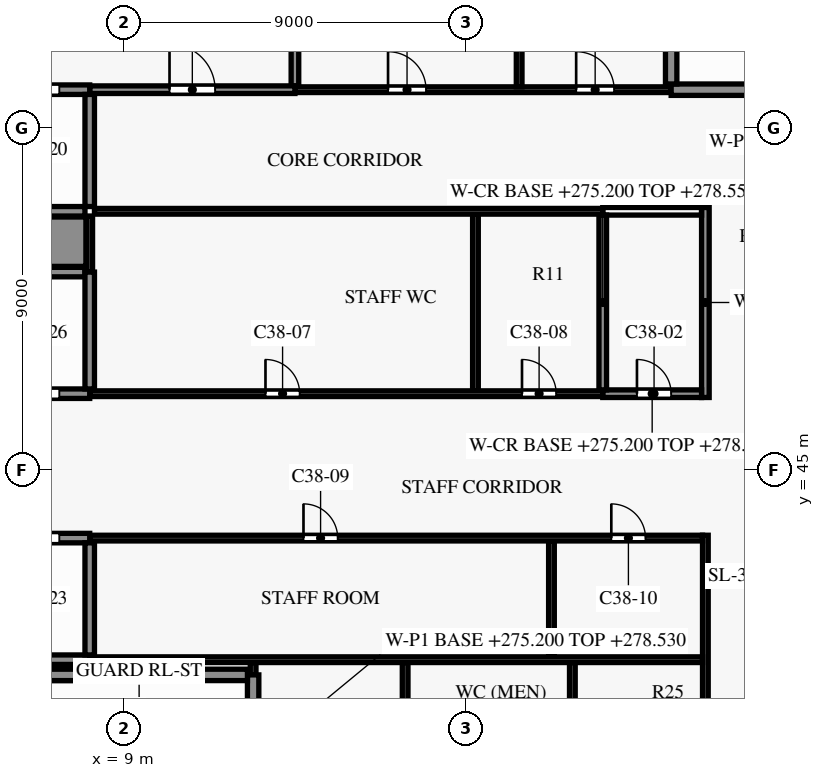
"""IFC4 building model, lengths in metres.
Left out: names, types, materials, properties, quantities, classifications, styles, units other than length and angle.
Written with IfcOpenShell. Run it as: python <this file> out.ifc"""

import sys

from ifc_helpers import new_model, si_unit, direction, frame, frame_2d, origin, place, context, subcontext, project, spatial, rectangle, extrude, element, fill, save


model = new_model("IFC4")
c1 = context("Model", 3, precision=1e-05, world=origin(), true_north=direction((0.0, 1.0)))
c2 = subcontext(c1, "Body", "Model", "MODEL_VIEW")
j1 = project(units=[si_unit("LENGTHUNIT", "METRE"), si_unit("PLANEANGLEUNIT", "RADIAN")], contexts=[c1])
p1 = place(None, origin())
s1 = spatial("IfcSite", under=j1, at=p1, CompositionType="ELEMENT")
p2 = place(p1, origin())
s2 = spatial("IfcBuilding", under=s1, at=p2, CompositionType="ELEMENT")
p3 = place(p2, frame((0.0, 0.0, 275.2)))
s3 = spatial("IfcBuildingStorey", under=s2, at=p3, CompositionType="ELEMENT", Elevation=275.2)
p4 = place(p3, frame((4.55, 39.6, 0.0), z_axis=(0.0, 0.0, 1.0), x_axis=(1.0, 0.0, 0.0)))
e1 = element("IfcWall", 1, at=p4, inside=s3, PredefinedType="SHEAR", context=c2, shape_type="SweptSolid", body=[
    extrude(rectangle(XDim=7.7, YDim=0.3, at=frame_2d((3.85, 0.0))), origin(), (0.0, 0.0, 1.0), 3.5),
])
p5 = place(p3, frame((8.1, 40.0, 0.0), z_axis=(0.0, 0.0, 1.0), x_axis=(1.0, 0.0, 0.0)))
e2 = element("IfcWall", 2, at=p5, inside=s3, PredefinedType="PARTITIONING", context=c2, shape_type="SweptSolid", body=[
    extrude(rectangle(XDim=16.125, YDim=0.15, at=frame_2d((8.062, 0.0))), origin(), (0.0, 0.0, 1.0), 3.35),
])
p6 = place(p3, frame((0.15, 40.0, 0.0), z_axis=(0.0, 0.0, 1.0), x_axis=(1.0, 0.0, 0.0)))
e3 = element("IfcWall", 3, at=p6, inside=s3, PredefinedType="SHEAR", context=c2, shape_type="SweptSolid", body=[
    extrude(rectangle(XDim=7.95, YDim=0.25, at=frame_2d((3.975, 0.0))), origin(), (0.0, 0.0, 1.0), 3.5),
])
p7 = place(p3, frame((8.1, 43.2, 0.0), z_axis=(0.0, 0.0, 1.0), x_axis=(1.0, 0.0, 0.0)))
e4 = element("IfcWall", 4, at=p7, inside=s3, PredefinedType="PARTITIONING", context=c2, shape_type="SweptSolid", body=[
    extrude(rectangle(XDim=16.125, YDim=0.15, at=frame_2d((8.062, 0.0))), origin(), (0.0, 0.0, 1.0), 3.35),
])
p8 = place(p7, frame((5.625, 0.0, 0.0)))
e5 = element("IfcOpeningElement", 5, at=p8, cuts=e4, PredefinedType="OPENING", context=c2, shape_type="SweptSolid", body=[
    extrude(rectangle(XDim=0.9, YDim=2.1, at=frame_2d((0.45, 1.05))), frame((0.0, 0.085, 0.0), z_axis=(0.0, -1.0, 0.0), x_axis=(1.0, 0.0, 0.0)), (0.0, 0.0, 1.0), 0.17),
])
p9 = place(p7, frame((13.725, 0.0, 0.0)))
e6 = element("IfcOpeningElement", 6, at=p9, cuts=e4, PredefinedType="OPENING", context=c2, shape_type="SweptSolid", body=[
    extrude(rectangle(XDim=0.9, YDim=2.1, at=frame_2d((0.45, 1.05))), frame((0.0, 0.085, 0.0), z_axis=(0.0, -1.0, 0.0), x_axis=(1.0, 0.0, 0.0)), (0.0, 0.0, 1.0), 0.17),
])
p10 = place(p3, frame((0.125, 43.2, 0.0), z_axis=(0.0, 0.0, 1.0), x_axis=(1.0, 0.0, 0.0)))
e7 = element("IfcWall", 7, at=p10, inside=s3, PredefinedType="SHEAR", context=c2, shape_type="SweptSolid", body=[
    extrude(rectangle(XDim=7.975, YDim=0.25, at=frame_2d((3.988, 0.0))), origin(), (0.0, 0.0, 1.0), 3.5),
])
p11 = place(p10, frame((0.675, 0.0, 0.0)))
e8 = element("IfcOpeningElement", 8, at=p11, cuts=e7, PredefinedType="OPENING", context=c2, shape_type="SweptSolid", body=[
    extrude(rectangle(XDim=1.1, YDim=2.1, at=frame_2d((0.55, 1.05))), frame((0.0, 0.135, 0.0), z_axis=(0.0, -1.0, 0.0), x_axis=(1.0, 0.0, 0.0)), (0.0, 0.0, 1.0), 0.27),
])
p12 = place(p10, frame((3.375, 0.0, 0.0)))
e9 = element("IfcOpeningElement", 9, at=p12, cuts=e7, PredefinedType="OPENING", context=c2, shape_type="SweptSolid", body=[
    extrude(rectangle(XDim=1.1, YDim=2.1, at=frame_2d((0.55, 1.05))), frame((0.0, 0.135, 0.0), z_axis=(0.0, -1.0, 0.0), x_axis=(1.0, 0.0, 0.0)), (0.0, 0.0, 1.0), 0.27),
])
p13 = place(p10, frame((6.075, 0.0, 0.0)))
e10 = element("IfcOpeningElement", 10, at=p13, cuts=e7, PredefinedType="OPENING", context=c2, shape_type="SweptSolid", body=[
    extrude(rectangle(XDim=1.1, YDim=2.1, at=frame_2d((0.55, 1.05))), frame((0.0, 0.135, 0.0), z_axis=(0.0, -1.0, 0.0), x_axis=(1.0, 0.0, 0.0)), (0.0, 0.0, 1.0), 0.27),
])
p14 = place(p3, frame((8.1, 47.0, 0.0), z_axis=(0.0, 0.0, 1.0), x_axis=(1.0, 0.0, 0.0)))
e11 = element("IfcWall", 11, at=p14, inside=s3, PredefinedType="PARTITIONING", context=c2, shape_type="SweptSolid", body=[
    extrude(rectangle(XDim=13.5, YDim=0.15, at=frame_2d((6.75, 0.0))), origin(), (0.0, 0.0, 1.0), 3.35),
])
p15 = place(p14, frame((4.625, 0.0, 0.0)))
e12 = element("IfcOpeningElement", 12, at=p15, cuts=e11, PredefinedType="OPENING", context=c2, shape_type="SweptSolid", body=[
    extrude(rectangle(XDim=0.9, YDim=2.1, at=frame_2d((0.45, 1.05))), frame((0.0, 0.085, 0.0), z_axis=(0.0, -1.0, 0.0), x_axis=(1.0, 0.0, 0.0)), (0.0, 0.0, 1.0), 0.17),
])
p16 = place(p14, frame((11.375, 0.0, 0.0)))
e13 = element("IfcOpeningElement", 13, at=p16, cuts=e11, PredefinedType="OPENING", context=c2, shape_type="SweptSolid", body=[
    extrude(rectangle(XDim=0.9, YDim=2.1, at=frame_2d((0.45, 1.05))), frame((0.0, 0.085, 0.0), z_axis=(0.0, -1.0, 0.0), x_axis=(1.0, 0.0, 0.0)), (0.0, 0.0, 1.0), 0.17),
])
p17 = place(p3, frame((21.6, 47.0, 0.0), z_axis=(0.0, 0.0, 1.0), x_axis=(1.0, 0.0, 0.0)))
e14 = element("IfcWall", 14, at=p17, inside=s3, PredefinedType="PARTITIONING", context=c2, shape_type="SweptSolid", body=[
    extrude(rectangle(XDim=2.6, YDim=0.2, at=frame_2d((1.3, 0.0))), origin(), (0.0, 0.0, 1.0), 3.35),
])
p18 = place(p17, frame((0.9, 0.0, 0.0)))
e15 = element("IfcOpeningElement", 15, at=p18, cuts=e14, PredefinedType="OPENING", context=c2, shape_type="SweptSolid", body=[
    extrude(rectangle(XDim=0.9, YDim=2.1, at=frame_2d((0.45, 1.05))), frame((0.0, 0.11, 0.0), z_axis=(0.0, -1.0, 0.0), x_axis=(1.0, 0.0, 0.0)), (0.0, 0.0, 1.0), 0.22),
])
p19 = place(p3, frame((0.125, 47.0, 0.0), z_axis=(0.0, 0.0, 1.0), x_axis=(1.0, 0.0, 0.0)))
e16 = element("IfcWall", 16, at=p19, inside=s3, PredefinedType="SHEAR", context=c2, shape_type="SweptSolid", body=[
    extrude(rectangle(XDim=7.975, YDim=0.25, at=frame_2d((3.988, 0.0))), origin(), (0.0, 0.0, 1.0), 3.5),
])
p20 = place(p19, frame((0.675, 0.0, 0.0)))
e17 = element("IfcOpeningElement", 17, at=p20, cuts=e16, PredefinedType="OPENING", context=c2, shape_type="SweptSolid", body=[
    extrude(rectangle(XDim=1.1, YDim=2.1, at=frame_2d((0.55, 1.05))), frame((0.0, 0.135, 0.0), z_axis=(0.0, -1.0, 0.0), x_axis=(1.0, 0.0, 0.0)), (0.0, 0.0, 1.0), 0.27),
])
p21 = place(p19, frame((3.375, 0.0, 0.0)))
e18 = element("IfcOpeningElement", 18, at=p21, cuts=e16, PredefinedType="OPENING", context=c2, shape_type="SweptSolid", body=[
    extrude(rectangle(XDim=1.1, YDim=2.1, at=frame_2d((0.55, 1.05))), frame((0.0, 0.135, 0.0), z_axis=(0.0, -1.0, 0.0), x_axis=(1.0, 0.0, 0.0)), (0.0, 0.0, 1.0), 0.27),
])
p22 = place(p19, frame((6.075, 0.0, 0.0)))
e19 = element("IfcOpeningElement", 19, at=p22, cuts=e16, PredefinedType="OPENING", context=c2, shape_type="SweptSolid", body=[
    extrude(rectangle(XDim=1.1, YDim=2.1, at=frame_2d((0.55, 1.05))), frame((0.0, 0.135, 0.0), z_axis=(0.0, -1.0, 0.0), x_axis=(1.0, 0.0, 0.0)), (0.0, 0.0, 1.0), 0.27),
])
p23 = place(p3, frame((0.125, 50.2, 0.0), z_axis=(0.0, 0.0, 1.0), x_axis=(1.0, 0.0, 0.0)))
e20 = element("IfcWall", 20, at=p23, inside=s3, PredefinedType="SHEAR", context=c2, shape_type="SweptSolid", body=[
    extrude(rectangle(XDim=7.85, YDim=0.25, at=frame_2d((3.925, 0.0))), origin(), (0.0, 0.0, 1.0), 3.5),
])
p24 = place(p3, frame((-0.125, 51.0, 0.0), z_axis=(0.0, 0.0, 1.0), x_axis=(1.0, 0.0, 0.0)))
e21 = element("IfcWall", 21, at=p24, inside=s3, PredefinedType="SHEAR", context=c2, shape_type="SweptSolid", body=[
    extrude(rectangle(XDim=8.125, YDim=1.3, at=frame_2d((4.062, 0.0))), origin(), (0.0, 0.0, 1.0), 3.5),
])
p25 = place(p3, frame((8.225, 51.8, 0.0), z_axis=(0.0, 0.0, 1.0), x_axis=(1.0, 0.0, 0.0)))
e22 = element("IfcWall", 22, at=p25, inside=s3, PredefinedType="PARTITIONING", context=c2, shape_type="SweptSolid", body=[
    extrude(rectangle(XDim=13.375, YDim=0.15, at=frame_2d((6.688, 0.0))), origin(), (0.0, 0.0, 1.0), 3.35),
])
p26 = place(p3, frame((21.6, 51.8, 0.0), z_axis=(0.0, 0.0, 1.0), x_axis=(1.0, 0.0, 0.0)))
e23 = element("IfcWall", 23, at=p26, inside=s3, PredefinedType="PARTITIONING", context=c2, shape_type="SweptSolid", body=[
    extrude(rectangle(XDim=2.6, YDim=0.2, at=frame_2d((1.3, 0.0))), origin(), (0.0, 0.0, 1.0), 3.35),
])
p27 = place(p3, frame((0.125, 51.8, 0.0), z_axis=(0.0, 0.0, 1.0), x_axis=(1.0, 0.0, 0.0)))
e24 = element("IfcWall", 24, at=p27, inside=s3, PredefinedType="SHEAR", context=c2, shape_type="SweptSolid", body=[
    extrude(rectangle(XDim=7.85, YDim=0.25, at=frame_2d((3.925, 0.0))), origin(), (0.0, 0.0, 1.0), 3.5),
])
p28 = place(p3, frame((8.1, 55.0, 0.0), z_axis=(0.0, 0.0, 1.0), x_axis=(1.0, 0.0, 0.0)))
e25 = element("IfcWall", 25, at=p28, inside=s3, PredefinedType="PARTITIONING", context=c2, shape_type="SweptSolid", body=[
    extrude(rectangle(XDim=5.4, YDim=0.2, at=frame_2d((2.7, 0.0))), origin(), (0.0, 0.0, 1.0), 3.35),
])
p29 = place(p28, frame((2.1, 0.0, 0.0)))
e26 = element("IfcOpeningElement", 26, at=p29, cuts=e25, PredefinedType="OPENING", context=c2, shape_type="SweptSolid", body=[
    extrude(rectangle(XDim=1.2, YDim=2.2, at=frame_2d((0.6, 1.1))), frame((0.0, 0.11, 0.0), z_axis=(0.0, -1.0, 0.0), x_axis=(1.0, 0.0, 0.0)), (0.0, 0.0, 1.0), 0.22),
])
p30 = place(p3, frame((13.5, 55.0, 0.0), z_axis=(0.0, 0.0, 1.0), x_axis=(1.0, 0.0, 0.0)))
e27 = element("IfcWall", 27, at=p30, inside=s3, PredefinedType="PARTITIONING", context=c2, shape_type="SweptSolid", body=[
    extrude(rectangle(XDim=9.9, YDim=0.15, at=frame_2d((4.95, 0.0))), origin(), (0.0, 0.0, 1.0), 3.35),
])
p31 = place(p30, frame((2.45, 0.0, 0.0)))
e28 = element("IfcOpeningElement", 28, at=p31, cuts=e27, PredefinedType="OPENING", context=c2, shape_type="SweptSolid", body=[
    extrude(rectangle(XDim=1.0, YDim=2.1, at=frame_2d((0.5, 1.05))), frame((0.0, 0.085, 0.0), z_axis=(0.0, -1.0, 0.0), x_axis=(1.0, 0.0, 0.0)), (0.0, 0.0, 1.0), 0.17),
])
p32 = place(p30, frame((7.4, 0.0, 0.0)))
e29 = element("IfcOpeningElement", 29, at=p32, cuts=e27, PredefinedType="OPENING", context=c2, shape_type="SweptSolid", body=[
    extrude(rectangle(XDim=1.0, YDim=2.1, at=frame_2d((0.5, 1.05))), frame((0.0, 0.085, 0.0), z_axis=(0.0, -1.0, 0.0), x_axis=(1.0, 0.0, 0.0)), (0.0, 0.0, 1.0), 0.17),
])
p33 = place(p3, frame((0.15, 55.0, 0.0), z_axis=(0.0, 0.0, 1.0), x_axis=(1.0, 0.0, 0.0)))
e30 = element("IfcWall", 30, at=p33, inside=s3, PredefinedType="SHEAR", context=c2, shape_type="SweptSolid", body=[
    extrude(rectangle(XDim=7.95, YDim=0.25, at=frame_2d((3.975, 0.0))), origin(), (0.0, 0.0, 1.0), 3.5),
])
p34 = place(p33, frame((0.65, 0.0, 0.0)))
e31 = element("IfcOpeningElement", 31, at=p34, cuts=e30, PredefinedType="OPENING", context=c2, shape_type="SweptSolid", body=[
    extrude(rectangle(XDim=1.1, YDim=2.1, at=frame_2d((0.55, 1.05))), frame((0.0, 0.135, 0.0), z_axis=(0.0, -1.0, 0.0), x_axis=(1.0, 0.0, 0.0)), (0.0, 0.0, 1.0), 0.27),
])
p35 = place(p33, frame((3.35, 0.0, 0.0)))
e32 = element("IfcOpeningElement", 32, at=p35, cuts=e30, PredefinedType="OPENING", context=c2, shape_type="SweptSolid", body=[
    extrude(rectangle(XDim=1.1, YDim=2.1, at=frame_2d((0.55, 1.05))), frame((0.0, 0.135, 0.0), z_axis=(0.0, -1.0, 0.0), x_axis=(1.0, 0.0, 0.0)), (0.0, 0.0, 1.0), 0.27),
])
p36 = place(p33, frame((6.05, 0.0, 0.0)))
e33 = element("IfcOpeningElement", 33, at=p36, cuts=e30, PredefinedType="OPENING", context=c2, shape_type="SweptSolid", body=[
    extrude(rectangle(XDim=1.1, YDim=2.1, at=frame_2d((0.55, 1.05))), frame((0.0, 0.135, 0.0), z_axis=(0.0, -1.0, 0.0), x_axis=(1.0, 0.0, 0.0)), (0.0, 0.0, 1.0), 0.27),
])
p37 = place(p3, frame((23.4, 55.0, 0.0), z_axis=(0.0, 0.0, 1.0), x_axis=(1.0, 0.0, 0.0)))
e34 = element("IfcWall", 34, at=p37, inside=s3, PredefinedType="SHEAR", context=c2, shape_type="SweptSolid", body=[
    extrude(rectangle(XDim=3.45, YDim=0.3, at=frame_2d((1.725, 0.0))), origin(), (0.0, 0.0, 1.0), 3.5),
])
p38 = place(p3, frame((8.1, 50.2, 0.0), z_axis=(0.0, 0.0, 1.0), x_axis=(0.0, 1.0, 0.0)))
e35 = element("IfcWall", 35, at=p38, inside=s3, PredefinedType="PARTITIONING", context=c2, shape_type="SweptSolid", body=[
    extrude(rectangle(XDim=1.475, YDim=0.15, at=frame_2d((0.738, 0.0))), origin(), (0.0, 0.0, 1.0), 3.35),
])
p39 = place(p3, frame((8.1, 40.125, 0.0), z_axis=(0.0, 0.0, 1.0), x_axis=(0.0, 1.0, 0.0)))
e36 = element("IfcWall", 36, at=p39, inside=s3, PredefinedType="SHEAR", context=c2, shape_type="SweptSolid", body=[
    extrude(rectangle(XDim=2.95, YDim=0.25, at=frame_2d((1.475, 0.0))), origin(), (0.0, 0.0, 1.0), 3.5),
])
p40 = place(p3, frame((8.1, 47.125, 0.0), z_axis=(0.0, 0.0, 1.0), x_axis=(0.0, 1.0, 0.0)))
e37 = element("IfcWall", 37, at=p40, inside=s3, PredefinedType="SHEAR", context=c2, shape_type="SweptSolid", body=[
    extrude(rectangle(XDim=3.075, YDim=0.25, at=frame_2d((1.538, 0.0))), origin(), (0.0, 0.0, 1.0), 3.5),
])
p41 = place(p3, frame((8.1, 51.925, 0.0), z_axis=(0.0, 0.0, 1.0), x_axis=(0.0, 1.0, 0.0)))
e38 = element("IfcWall", 38, at=p41, inside=s3, PredefinedType="SHEAR", context=c2, shape_type="SweptSolid", body=[
    extrude(rectangle(XDim=2.95, YDim=0.25, at=frame_2d((1.475, 0.0))), origin(), (0.0, 0.0, 1.0), 3.5),
])
p42 = place(p3, frame((12.4, 39.6, 0.0), z_axis=(0.0, 0.0, 1.0), x_axis=(0.0, 1.0, 0.0)))
e39 = element("IfcWall", 39, at=p42, inside=s3, PredefinedType="PARTITIONING", context=c2, shape_type="SweptSolid", body=[
    extrude(rectangle(XDim=0.325, YDim=0.15, at=frame_2d((0.163, 0.0))), origin(), (0.0, 0.0, 1.0), 3.35),
])
p43 = place(p3, frame((12.4, 36.15, 0.0), z_axis=(0.0, 0.0, 1.0), x_axis=(0.0, 1.0, 0.0)))
e40 = element("IfcWall", 40, at=p43, inside=s3, PredefinedType="SHEAR", context=c2, shape_type="SweptSolid", body=[
    extrude(rectangle(XDim=3.45, YDim=0.3, at=frame_2d((1.725, 0.0))), origin(), (0.0, 0.0, 1.0), 3.5),
])
p44 = place(p3, frame((13.5, 55.1, 0.0), z_axis=(0.0, 0.0, 1.0), x_axis=(0.0, 1.0, 0.0)))
e41 = element("IfcWall", 41, at=p44, inside=s3, PredefinedType="PARTITIONING", context=c2, shape_type="SweptSolid", body=[
    extrude(rectangle(XDim=3.9, YDim=0.2, at=frame_2d((1.95, 0.0))), origin(), (0.0, 0.0, 1.0), 3.35),
])
p45 = place(p3, frame((16.4, 36.075, 0.0), z_axis=(0.0, 0.0, 1.0), x_axis=(0.0, 1.0, 0.0)))
e42 = element("IfcWall", 42, at=p45, inside=s3, PredefinedType="PARTITIONING", context=c2, shape_type="SweptSolid", body=[
    extrude(rectangle(XDim=3.85, YDim=0.15, at=frame_2d((1.925, 0.0))), origin(), (0.0, 0.0, 1.0), 3.35),
])
p46 = place(p3, frame((18.25, 47.075, 0.0), z_axis=(0.0, 0.0, 1.0), x_axis=(0.0, 1.0, 0.0)))
e43 = element("IfcWall", 43, at=p46, inside=s3, PredefinedType="PARTITIONING", context=c2, shape_type="SweptSolid", body=[
    extrude(rectangle(XDim=4.65, YDim=0.15, at=frame_2d((2.325, 0.0))), origin(), (0.0, 0.0, 1.0), 3.35),
])
p47 = place(p3, frame((19.4, 55.075, 0.0), z_axis=(0.0, 0.0, 1.0), x_axis=(0.0, 1.0, 0.0)))
e44 = element("IfcWall", 44, at=p47, inside=s3, PredefinedType="PARTITIONING", context=c2, shape_type="SweptSolid", body=[
    extrude(rectangle(XDim=7.075, YDim=0.15, at=frame_2d((3.538, 0.0))), origin(), (0.0, 0.0, 1.0), 3.35),
])
p48 = place(p3, frame((20.25, 40.075, 0.0), z_axis=(0.0, 0.0, 1.0), x_axis=(0.0, 1.0, 0.0)))
e45 = element("IfcWall", 45, at=p48, inside=s3, PredefinedType="PARTITIONING", context=c2, shape_type="SweptSolid", body=[
    extrude(rectangle(XDim=3.05, YDim=0.15, at=frame_2d((1.525, 0.0))), origin(), (0.0, 0.0, 1.0), 3.35),
])
p49 = place(p3, frame((20.8, 36.075, 0.0), z_axis=(0.0, 0.0, 1.0), x_axis=(0.0, 1.0, 0.0)))
e46 = element("IfcWall", 46, at=p49, inside=s3, PredefinedType="PARTITIONING", context=c2, shape_type="SweptSolid", body=[
    extrude(rectangle(XDim=3.85, YDim=0.15, at=frame_2d((1.925, 0.0))), origin(), (0.0, 0.0, 1.0), 3.35),
])
p50 = place(p3, frame((21.6, 47.1, 0.0), z_axis=(0.0, 0.0, 1.0), x_axis=(0.0, 1.0, 0.0)))
e47 = element("IfcWall", 47, at=p50, inside=s3, PredefinedType="PARTITIONING", context=c2, shape_type="SweptSolid", body=[
    extrude(rectangle(XDim=4.6, YDim=0.2, at=frame_2d((2.3, 0.0))), origin(), (0.0, 0.0, 1.0), 3.35),
])
p51 = place(p3, frame((23.4, 55.15, 0.0), z_axis=(0.0, 0.0, 1.0), x_axis=(0.0, 1.0, 0.0)))
e48 = element("IfcWall", 48, at=p51, inside=s3, PredefinedType="SHEAR", context=c2, shape_type="SweptSolid", body=[
    extrude(rectangle(XDim=8.0, YDim=0.3, at=frame_2d((4.0, 0.0))), origin(), (0.0, 0.0, 1.0), 3.5),
])
p52 = place(p3, frame((24.3, 35.925, 0.0), z_axis=(0.0, 0.0, 1.0), x_axis=(0.0, 1.0, 0.0)))
e49 = element("IfcWall", 49, at=p52, inside=s3, PredefinedType="PARTITIONING", context=c2, shape_type="SweptSolid", body=[
    extrude(rectangle(XDim=7.35, YDim=0.15, at=frame_2d((3.675, 0.0))), origin(), (0.0, 0.0, 1.0), 3.35),
])
p53 = place(p3, frame((24.3, 46.9, 0.0), z_axis=(0.0, 0.0, 1.0), x_axis=(0.0, 1.0, 0.0)))
e50 = element("IfcWall", 50, at=p53, inside=s3, PredefinedType="SHEAR", context=c2, shape_type="SweptSolid", body=[
    extrude(rectangle(XDim=5.0, YDim=0.2, at=frame_2d((2.5, 0.0))), origin(), (0.0, 0.0, 1.0), 3.5),
])
p54 = place(p29, origin())
e51 = element("IfcDoor", 51, at=p54, inside=s3, OperationType="SINGLE_SWING_RIGHT", PredefinedType="DOOR", context=c2, shape_type="SweptSolid", body=[
    extrude(rectangle(XDim=1.2, YDim=2.2, at=frame_2d((0.6, 1.1))), frame((0.0, 0.025, 0.0), z_axis=(0.0, -1.0, 0.0), x_axis=(1.0, 0.0, 0.0)), (0.0, 0.0, 1.0), 0.05),
])
fill(e26, e51)
p55 = place(p18, origin())
e52 = element("IfcDoor", 52, at=p55, inside=s3, OperationType="SINGLE_SWING_LEFT", PredefinedType="DOOR", context=c2, shape_type="SweptSolid", body=[
    extrude(rectangle(XDim=0.9, YDim=2.1, at=frame_2d((0.45, 1.05))), frame((0.0, 0.025, 0.0), z_axis=(0.0, -1.0, 0.0), x_axis=(1.0, 0.0, 0.0)), (0.0, 0.0, 1.0), 0.05),
])
fill(e15, e52)
p56 = place(p15, origin())
e53 = element("IfcDoor", 53, at=p56, inside=s3, OperationType="SINGLE_SWING_LEFT", PredefinedType="DOOR", context=c2, shape_type="SweptSolid", body=[
    extrude(rectangle(XDim=0.9, YDim=2.1, at=frame_2d((0.45, 1.05))), frame((0.0, 0.025, 0.0), z_axis=(0.0, -1.0, 0.0), x_axis=(1.0, 0.0, 0.0)), (0.0, 0.0, 1.0), 0.05),
])
fill(e12, e53)
p57 = place(p16, origin())
e54 = element("IfcDoor", 54, at=p57, inside=s3, OperationType="SINGLE_SWING_RIGHT", PredefinedType="DOOR", context=c2, shape_type="SweptSolid", body=[
    extrude(rectangle(XDim=0.9, YDim=2.1, at=frame_2d((0.45, 1.05))), frame((0.0, 0.025, 0.0), z_axis=(0.0, -1.0, 0.0), x_axis=(1.0, 0.0, 0.0)), (0.0, 0.0, 1.0), 0.05),
])
fill(e13, e54)
p58 = place(p8, origin())
e55 = element("IfcDoor", 55, at=p58, inside=s3, OperationType="SINGLE_SWING_RIGHT", PredefinedType="DOOR", context=c2, shape_type="SweptSolid", body=[
    extrude(rectangle(XDim=0.9, YDim=2.1, at=frame_2d((0.45, 1.05))), frame((0.0, 0.025, 0.0), z_axis=(0.0, -1.0, 0.0), x_axis=(1.0, 0.0, 0.0)), (0.0, 0.0, 1.0), 0.05),
])
fill(e5, e55)
p59 = place(p9, origin())
e56 = element("IfcDoor", 56, at=p59, inside=s3, OperationType="SINGLE_SWING_LEFT", PredefinedType="DOOR", context=c2, shape_type="SweptSolid", body=[
    extrude(rectangle(XDim=0.9, YDim=2.1, at=frame_2d((0.45, 1.05))), frame((0.0, 0.025, 0.0), z_axis=(0.0, -1.0, 0.0), x_axis=(1.0, 0.0, 0.0)), (0.0, 0.0, 1.0), 0.05),
])
fill(e6, e56)
p60 = place(p31, origin())
e57 = element("IfcDoor", 57, at=p60, inside=s3, OperationType="SINGLE_SWING_LEFT", PredefinedType="DOOR", context=c2, shape_type="SweptSolid", body=[
    extrude(rectangle(XDim=1.0, YDim=2.1, at=frame_2d((0.5, 1.05))), frame((0.0, 0.025, 0.0), z_axis=(0.0, -1.0, 0.0), x_axis=(1.0, 0.0, 0.0)), (0.0, 0.0, 1.0), 0.05),
])
fill(e28, e57)
p61 = place(p32, origin())
e58 = element("IfcDoor", 58, at=p61, inside=s3, OperationType="SINGLE_SWING_RIGHT", PredefinedType="DOOR", context=c2, shape_type="SweptSolid", body=[
    extrude(rectangle(XDim=1.0, YDim=2.1, at=frame_2d((0.5, 1.05))), frame((0.0, 0.025, 0.0), z_axis=(0.0, -1.0, 0.0), x_axis=(1.0, 0.0, 0.0)), (0.0, 0.0, 1.0), 0.05),
])
fill(e29, e58)
p62 = place(p36, origin())
e59 = element("IfcDoor", 59, at=p62, inside=s3, OperationType="DOUBLE_DOOR_SLIDING", PredefinedType="DOOR", context=c2, shape_type="SweptSolid", body=[
    extrude(rectangle(XDim=1.1, YDim=2.1, at=frame_2d((0.55, 1.05))), frame((0.0, 0.025, 0.0), z_axis=(0.0, -1.0, 0.0), x_axis=(1.0, 0.0, 0.0)), (0.0, 0.0, 1.0), 0.05),
])
fill(e33, e59)
p63 = place(p13, origin())
e60 = element("IfcDoor", 60, at=p63, inside=s3, OperationType="DOUBLE_DOOR_SLIDING", PredefinedType="DOOR", context=c2, shape_type="SweptSolid", body=[
    extrude(rectangle(XDim=1.1, YDim=2.1, at=frame_2d((0.55, 1.05))), frame((0.0, 0.025, 0.0), z_axis=(0.0, -1.0, 0.0), x_axis=(1.0, 0.0, 0.0)), (0.0, 0.0, 1.0), 0.05),
])
fill(e10, e60)
p64 = place(p22, origin())
e61 = element("IfcDoor", 61, at=p64, inside=s3, OperationType="DOUBLE_DOOR_SLIDING", PredefinedType="DOOR", context=c2, shape_type="SweptSolid", body=[
    extrude(rectangle(XDim=1.1, YDim=2.1, at=frame_2d((0.55, 1.05))), frame((0.0, 0.025, 0.0), z_axis=(0.0, -1.0, 0.0), x_axis=(1.0, 0.0, 0.0)), (0.0, 0.0, 1.0), 0.05),
])
fill(e19, e61)
save(model, sys.argv[1])
